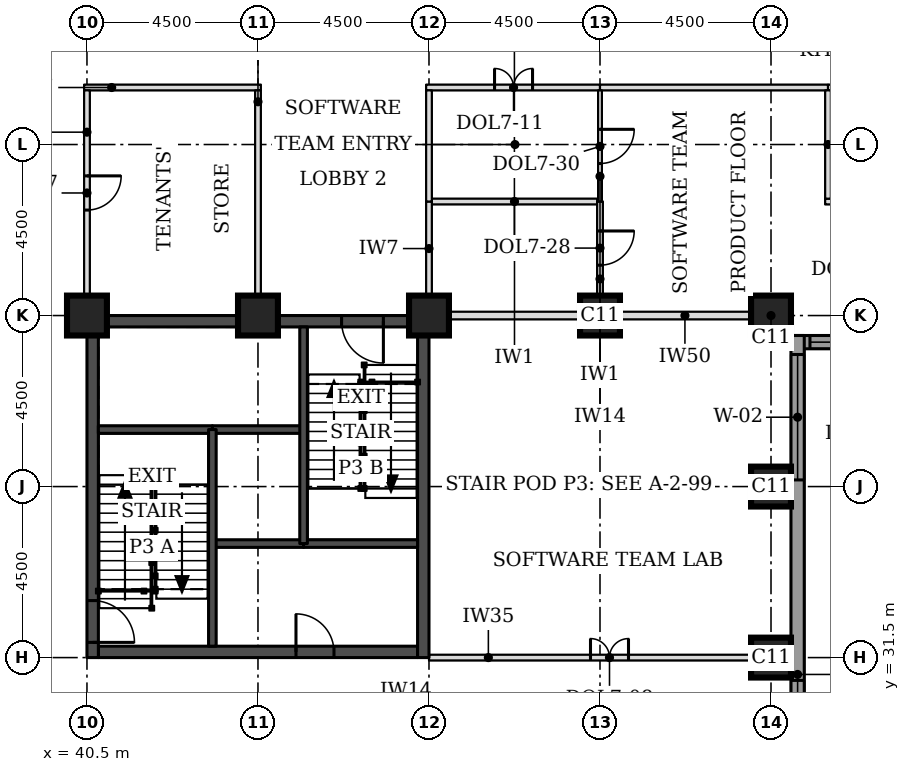
"""IFC4 building model, lengths in metres.
Left out: names, types, materials, properties, quantities, classifications, styles, units other than length and angle.
Written with IfcOpenShell. Run it as: python <this file> out.ifc"""

import sys

from ifc_helpers import new_model, si_unit, direction, frame, frame_2d, origin, origin_2d, place, context, subcontext, project, spatial, rectangle, extrude, element, fill, save


model = new_model("IFC4")
c1 = context("Model", 3, precision=1e-05, world=origin(), true_north=direction((0.0, 1.0)))
c2 = subcontext(c1, "Body", "Model", "MODEL_VIEW")
j1 = project(units=[si_unit("LENGTHUNIT", "METRE"), si_unit("PLANEANGLEUNIT", "RADIAN")], contexts=[c1])
p1 = place(None, origin())
s1 = spatial("IfcSite", under=j1, at=p1, CompositionType="ELEMENT")
p2 = place(p1, origin())
s2 = spatial("IfcBuilding", under=s1, at=p2, CompositionType="ELEMENT")
p3 = place(p2, frame((0.0, 0.0, 130.7)))
s3 = spatial("IfcBuildingStorey", under=s2, at=p3, CompositionType="ELEMENT", Elevation=130.7)
for number, where, z_axis, x_axis in (
    (1, (58.5, 31.5, 0.0), (0.0, 0.0, 1.0), (1.0, 0.0, 0.0)),
    (2, (58.5, 36.0, 0.0), (0.0, 0.0, 1.0), (1.0, 0.0, 0.0)),
    (3, (40.5, 40.5, 0.0), (0.0, 0.0, 1.0), (1.0, 0.0, 0.0)),
    (4, (45.0, 40.5, 0.0), (0.0, 0.0, 1.0), (1.0, 0.0, 0.0)),
    (5, (49.5, 40.5, 0.0), (0.0, 0.0, 1.0), (1.0, 0.0, 0.0)),
    (6, (54.0, 40.5, 0.0), (0.0, 0.0, 1.0), (1.0, 0.0, 0.0)),
    (7, (58.5, 40.5, 0.0), (0.0, 0.0, 1.0), (1.0, 0.0, 0.0)),
):
    element("IfcColumn", number, at=place(p3, frame(where, z_axis=z_axis, x_axis=x_axis)), inside=s3, PredefinedType="COLUMN", context=c2, shape_type="SweptSolid", body=[
        extrude(rectangle(XDim=1.05, YDim=1.05, at=origin_2d()), origin(), (0.0, 0.0, 1.0), 3.7),
    ])
p4 = place(p3, frame((40.8, 31.65, 0.0), z_axis=(0.0, 0.0, 1.0), x_axis=(1.0, 0.0, 0.0)))
e8 = element("IfcWall", 8, at=p4, inside=s3, PredefinedType="SHEAR", context=c2, shape_type="SweptSolid", body=[
    extrude(rectangle(XDim=8.4, YDim=0.3, at=frame_2d((4.2, 0.0))), origin(), (0.0, 0.0, 1.0), 3.7),
])
p5 = place(p4, frame((5.2, 0.0, 0.0)))
e9 = element("IfcOpeningElement", 9, at=p5, cuts=e8, PredefinedType="OPENING", context=c2, shape_type="SweptSolid", body=[
    extrude(rectangle(XDim=1.0, YDim=2.1, at=frame_2d((0.5, 1.05))), frame((0.0, 0.16, 0.0), z_axis=(0.0, -1.0, 0.0), x_axis=(1.0, 0.0, 0.0)), (0.0, 0.0, 1.0), 0.32),
])
p6 = place(p3, frame((40.8, 40.35, 0.0), z_axis=(0.0, 0.0, 1.0), x_axis=(1.0, 0.0, 0.0)))
e10 = element("IfcWall", 10, at=p6, inside=s3, PredefinedType="SHEAR", context=c2, shape_type="SweptSolid", body=[
    extrude(rectangle(XDim=8.4, YDim=0.3, at=frame_2d((4.2, 0.0))), origin(), (0.0, 0.0, 1.0), 3.7),
])
p7 = place(p6, frame((6.4, 0.0, 0.0)))
e11 = element("IfcOpeningElement", 11, at=p7, cuts=e10, PredefinedType="OPENING", context=c2, shape_type="SweptSolid", body=[
    extrude(rectangle(XDim=1.1, YDim=2.1, at=frame_2d((0.55, 1.05))), frame((0.0, 0.16, 0.0), z_axis=(0.0, -1.0, 0.0), x_axis=(1.0, 0.0, 0.0)), (0.0, 0.0, 1.0), 0.32),
])
p8 = place(p3, frame((40.65, 31.5, 0.0), z_axis=(0.0, 0.0, 1.0), x_axis=(0.0, 1.0, 0.0)))
e12 = element("IfcWall", 12, at=p8, inside=s3, PredefinedType="SHEAR", context=c2, shape_type="SweptSolid", body=[
    extrude(rectangle(XDim=9.0, YDim=0.3, at=frame_2d((4.5, 0.0))), origin(), (0.0, 0.0, 1.0), 3.7),
])
p9 = place(p8, frame((0.4, 0.0, 0.0)))
e13 = element("IfcOpeningElement", 13, at=p9, cuts=e12, PredefinedType="OPENING", context=c2, shape_type="SweptSolid", body=[
    extrude(rectangle(XDim=1.1, YDim=2.1, at=frame_2d((0.55, 1.05))), frame((0.0, 0.16, 0.0), z_axis=(0.0, -1.0, 0.0), x_axis=(1.0, 0.0, 0.0)), (0.0, 0.0, 1.0), 0.32),
])
p10 = place(p3, frame((49.35, 31.5, 0.0), z_axis=(0.0, 0.0, 1.0), x_axis=(0.0, 1.0, 0.0)))
e14 = element("IfcWall", 14, at=p10, inside=s3, PredefinedType="SHEAR", context=c2, shape_type="SweptSolid", body=[
    extrude(rectangle(XDim=9.0, YDim=0.3, at=frame_2d((4.5, 0.0))), origin(), (0.0, 0.0, 1.0), 3.7),
])
p11 = place(p3, frame((59.025, 39.8, 0.0), z_axis=(0.0, 0.0, 1.0), x_axis=(1.0, 0.0, 0.0)))
e15 = element("IfcWall", 15, at=p11, inside=s3, PredefinedType="STANDARD", context=c2, shape_type="SweptSolid", body=[
    extrude(rectangle(XDim=13.337, YDim=0.35, at=frame_2d((6.669, 0.0))), origin(), (0.0, 0.0, 1.0), 3.525),
])
p12 = place(p11, frame((0.5, 0.0, 0.9)))
e16 = element("IfcOpeningElement", 16, at=p12, cuts=e15, PredefinedType="OPENING", context=c2, shape_type="SweptSolid", body=[
    extrude(rectangle(XDim=3.3, YDim=1.9, at=frame_2d((1.65, 0.95))), frame((0.0, 0.185, 0.0), z_axis=(0.0, -1.0, 0.0), x_axis=(1.0, 0.0, 0.0)), (0.0, 0.0, 1.0), 0.37),
])
p13 = place(p3, frame((59.2, 22.138, 0.0), z_axis=(0.0, 0.0, 1.0), x_axis=(0.0, 1.0, 0.0)))
e17 = element("IfcWall", 17, at=p13, inside=s3, PredefinedType="STANDARD", context=c2, shape_type="SweptSolid", body=[
    extrude(rectangle(XDim=17.837, YDim=0.35, at=frame_2d((8.919, 0.0))), origin(), (0.0, 0.0, 1.0), 3.525),
])
p14 = place(p13, frame((5.462, 0.0, 0.9)))
e18 = element("IfcOpeningElement", 18, at=p14, cuts=e17, PredefinedType="OPENING", context=c2, shape_type="SweptSolid", body=[
    extrude(rectangle(XDim=3.3, YDim=1.9, at=frame_2d((1.65, 0.95))), frame((0.0, 0.185, 0.0), z_axis=(0.0, -1.0, 0.0), x_axis=(1.0, 0.0, 0.0)), (0.0, 0.0, 1.0), 0.37),
])
p15 = place(p13, frame((14.037, 0.0, 0.9)))
e19 = element("IfcOpeningElement", 19, at=p15, cuts=e17, PredefinedType="OPENING", context=c2, shape_type="SweptSolid", body=[
    extrude(rectangle(XDim=3.3, YDim=1.9, at=frame_2d((1.65, 0.95))), frame((0.0, 0.185, 0.0), z_axis=(0.0, -1.0, 0.0), x_axis=(1.0, 0.0, 0.0)), (0.0, 0.0, 1.0), 0.37),
])
p16 = place(p3, frame((49.5, 31.5, 0.0), z_axis=(0.0, 0.0, 1.0), x_axis=(1.0, 0.0, 0.0)))
e20 = element("IfcWall", 20, at=p16, inside=s3, PredefinedType="PARTITIONING", context=c2, shape_type="SweptSolid", body=[
    extrude(rectangle(XDim=9.525, YDim=0.15, at=frame_2d((4.762, 0.0))), origin(), (0.0, 0.0, 1.0), 2.55),
])
p17 = place(p16, frame((4.25, 0.0, 0.0)))
e21 = element("IfcOpeningElement", 21, at=p17, cuts=e20, PredefinedType="OPENING", context=c2, shape_type="SweptSolid", body=[
    extrude(rectangle(XDim=1.0, YDim=2.1, at=frame_2d((0.5, 1.05))), frame((0.0, 0.085, 0.0), z_axis=(0.0, -1.0, 0.0), x_axis=(1.0, 0.0, 0.0)), (0.0, 0.0, 1.0), 0.17),
])
p18 = place(p3, frame((50.015, 40.5, 0.0), z_axis=(0.0, 0.0, 1.0), x_axis=(1.0, 0.0, 0.0)))
e22 = element("IfcWall", 22, at=p18, inside=s3, PredefinedType="PARTITIONING", context=c2, shape_type="SweptSolid", body=[
    extrude(rectangle(XDim=3.46, YDim=0.2, at=frame_2d((1.73, 0.0))), origin(), (0.0, 0.0, 1.0), 2.8),
])
p19 = place(p3, frame((54.495, 40.5, 0.0), z_axis=(0.0, 0.0, 1.0), x_axis=(1.0, 0.0, 0.0)))
e23 = element("IfcWall", 23, at=p19, inside=s3, PredefinedType="PARTITIONING", context=c2, shape_type="SweptSolid", body=[
    extrude(rectangle(XDim=3.48, YDim=0.2, at=frame_2d((1.74, 0.0))), origin(), (0.0, 0.0, 1.0), 2.8),
])
p20 = place(p3, frame((49.575, 43.5, 0.0), z_axis=(0.0, 0.0, 1.0), x_axis=(1.0, 0.0, 0.0)))
e24 = element("IfcWall", 24, at=p20, inside=s3, PredefinedType="PARTITIONING", context=c2, shape_type="SweptSolid", body=[
    extrude(rectangle(XDim=4.35, YDim=0.15, at=frame_2d((2.175, 0.0))), origin(), (0.0, 0.0, 1.0), 3.55),
])
p21 = place(p3, frame((59.925, 43.5, 0.0), z_axis=(0.0, 0.0, 1.0), x_axis=(1.0, 0.0, 0.0)))
e25 = element("IfcWall", 25, at=p21, inside=s3, PredefinedType="PARTITIONING", context=c2, shape_type="SweptSolid", body=[
    extrude(rectangle(XDim=2.975, YDim=0.15, at=frame_2d((1.487, 0.0))), origin(), (0.0, 0.0, 1.0), 3.55),
])
p22 = place(p21, frame((1.05, 0.0, 0.0)))
e26 = element("IfcOpeningElement", 26, at=p22, cuts=e25, PredefinedType="OPENING", context=c2, shape_type="SweptSolid", body=[
    extrude(rectangle(XDim=0.9, YDim=2.1, at=frame_2d((0.45, 1.05))), frame((0.0, 0.085, 0.0), z_axis=(0.0, -1.0, 0.0), x_axis=(1.0, 0.0, 0.0)), (0.0, 0.0, 1.0), 0.17),
])
p23 = place(p3, frame((40.425, 46.5, 0.0), z_axis=(0.0, 0.0, 1.0), x_axis=(1.0, 0.0, 0.0)))
e27 = element("IfcWall", 27, at=p23, inside=s3, PredefinedType="PARTITIONING", context=c2, shape_type="SweptSolid", body=[
    extrude(rectangle(XDim=4.65, YDim=0.15, at=frame_2d((2.325, 0.0))), origin(), (0.0, 0.0, 1.0), 3.55),
])
p24 = place(p3, frame((49.425, 46.5, 0.0), z_axis=(0.0, 0.0, 1.0), x_axis=(1.0, 0.0, 0.0)))
e28 = element("IfcWall", 28, at=p24, inside=s3, PredefinedType="PARTITIONING", context=c2, shape_type="SweptSolid", body=[
    extrude(rectangle(XDim=4.575, YDim=0.15, at=frame_2d((2.288, 0.0))), origin(), (0.0, 0.0, 1.0), 3.55),
])
p25 = place(p24, frame((1.8, 0.0, 0.0)))
e29 = element("IfcOpeningElement", 29, at=p25, cuts=e28, PredefinedType="OPENING", context=c2, shape_type="SweptSolid", body=[
    extrude(rectangle(XDim=1.0, YDim=2.1, at=frame_2d((0.5, 1.05))), frame((0.0, 0.085, 0.0), z_axis=(0.0, -1.0, 0.0), x_axis=(1.0, 0.0, 0.0)), (0.0, 0.0, 1.0), 0.17),
])
p26 = place(p3, frame((54.0, 46.5, 0.0), z_axis=(0.0, 0.0, 1.0), x_axis=(1.0, 0.0, 0.0)))
e30 = element("IfcWall", 30, at=p26, inside=s3, PredefinedType="PARTITIONING", context=c2, shape_type="SweptSolid", body=[
    extrude(rectangle(XDim=6.0, YDim=0.15, at=frame_2d((3.0, 0.0))), origin(), (0.0, 0.0, 1.0), 3.55),
])
p27 = place(p3, frame((60.0, 46.5, 0.0), z_axis=(0.0, 0.0, 1.0), x_axis=(1.0, 0.0, 0.0)))
e31 = element("IfcWall", 31, at=p27, inside=s3, PredefinedType="PARTITIONING", context=c2, shape_type="SweptSolid", body=[
    extrude(rectangle(XDim=3.0, YDim=0.15, at=frame_2d((1.5, 0.0))), origin(), (0.0, 0.0, 1.0), 3.55),
])
p28 = place(p3, frame((40.5, 41.025, 0.0), z_axis=(0.0, 0.0, 1.0), x_axis=(0.0, 1.0, 0.0)))
e32 = element("IfcWall", 32, at=p28, inside=s3, PredefinedType="PARTITIONING", context=c2, shape_type="SweptSolid", body=[
    extrude(rectangle(XDim=5.4, YDim=0.15, at=frame_2d((2.7, 0.0))), origin(), (0.0, 0.0, 1.0), 3.55),
])
p29 = place(p28, frame((2.25, 0.0, 0.0)))
e33 = element("IfcOpeningElement", 33, at=p29, cuts=e32, PredefinedType="OPENING", context=c2, shape_type="SweptSolid", body=[
    extrude(rectangle(XDim=0.9, YDim=2.1, at=frame_2d((0.45, 1.05))), frame((0.0, 0.085, 0.0), z_axis=(0.0, -1.0, 0.0), x_axis=(1.0, 0.0, 0.0)), (0.0, 0.0, 1.0), 0.17),
])
p30 = place(p3, frame((45.0, 41.025, 0.0), z_axis=(0.0, 0.0, 1.0), x_axis=(0.0, 1.0, 0.0)))
e34 = element("IfcWall", 34, at=p30, inside=s3, PredefinedType="PARTITIONING", context=c2, shape_type="SweptSolid", body=[
    extrude(rectangle(XDim=5.4, YDim=0.15, at=frame_2d((2.7, 0.0))), origin(), (0.0, 0.0, 1.0), 3.55),
])
p31 = place(p3, frame((49.5, 41.025, 0.0), z_axis=(0.0, 0.0, 1.0), x_axis=(0.0, 1.0, 0.0)))
e35 = element("IfcWall", 35, at=p31, inside=s3, PredefinedType="PARTITIONING", context=c2, shape_type="SweptSolid", body=[
    extrude(rectangle(XDim=2.475, YDim=0.15, at=frame_2d((1.238, 0.0))), origin(), (0.0, 0.0, 1.0), 3.55),
])
p32 = place(p3, frame((54.0, 41.025, 0.0), z_axis=(0.0, 0.0, 1.0), x_axis=(0.0, 1.0, 0.0)))
e36 = element("IfcWall", 36, at=p32, inside=s3, PredefinedType="PARTITIONING", context=c2, shape_type="SweptSolid", body=[
    extrude(rectangle(XDim=2.475, YDim=0.15, at=frame_2d((1.238, 0.0))), origin(), (0.0, 0.0, 1.0), 3.55),
])
p33 = place(p32, frame((0.8, 0.0, 0.0)))
e37 = element("IfcOpeningElement", 37, at=p33, cuts=e36, PredefinedType="OPENING", context=c2, shape_type="SweptSolid", body=[
    extrude(rectangle(XDim=0.9, YDim=2.1, at=frame_2d((0.45, 1.05))), frame((0.0, 0.085, 0.0), z_axis=(0.0, -1.0, 0.0), x_axis=(1.0, 0.0, 0.0)), (0.0, 0.0, 1.0), 0.17),
])
p34 = place(p3, frame((49.5, 43.5, 0.0), z_axis=(0.0, 0.0, 1.0), x_axis=(0.0, 1.0, 0.0)))
e38 = element("IfcWall", 38, at=p34, inside=s3, PredefinedType="PARTITIONING", context=c2, shape_type="SweptSolid", body=[
    extrude(rectangle(XDim=2.925, YDim=0.15, at=frame_2d((1.462, 0.0))), origin(), (0.0, 0.0, 1.0), 3.55),
])
p35 = place(p3, frame((54.0, 43.5, 0.0), z_axis=(0.0, 0.0, 1.0), x_axis=(0.0, 1.0, 0.0)))
e39 = element("IfcWall", 39, at=p35, inside=s3, PredefinedType="PARTITIONING", context=c2, shape_type="SweptSolid", body=[
    extrude(rectangle(XDim=2.925, YDim=0.1, at=frame_2d((1.462, 0.0))), origin(), (0.0, 0.0, 1.0), 3.55),
])
p36 = place(p35, frame((1.0, 0.0, 0.0)))
e40 = element("IfcOpeningElement", 40, at=p36, cuts=e39, PredefinedType="OPENING", context=c2, shape_type="SweptSolid", body=[
    extrude(rectangle(XDim=0.9, YDim=2.1, at=frame_2d((0.45, 1.05))), frame((0.0, 0.06, 0.0), z_axis=(0.0, -1.0, 0.0), x_axis=(1.0, 0.0, 0.0)), (0.0, 0.0, 1.0), 0.12),
])
p37 = place(p3, frame((60.0, 43.575, 0.0), z_axis=(0.0, 0.0, 1.0), x_axis=(0.0, 1.0, 0.0)))
e41 = element("IfcWall", 41, at=p37, inside=s3, PredefinedType="PARTITIONING", context=c2, shape_type="SweptSolid", body=[
    extrude(rectangle(XDim=2.85, YDim=0.15, at=frame_2d((1.425, 0.0))), origin(), (0.0, 0.0, 1.0), 3.55),
])
p38 = place(p3, frame((43.8, 34.5, 0.0), z_axis=(0.0, 0.0, 1.0), x_axis=(1.0, 0.0, 0.0)))
e42 = element("IfcWall", 42, at=p38, inside=s3, PredefinedType="SOLIDWALL", context=c2, shape_type="SweptSolid", body=[
    extrude(rectangle(XDim=2.4, YDim=0.2, at=frame_2d((1.2, 0.0))), origin(), (0.0, 0.0, 1.0), 3.55),
])
p39 = place(p3, frame((46.2, 34.5, 0.0), z_axis=(0.0, 0.0, 1.0), x_axis=(1.0, 0.0, 0.0)))
e43 = element("IfcWall", 43, at=p39, inside=s3, PredefinedType="SOLIDWALL", context=c2, shape_type="SweptSolid", body=[
    extrude(rectangle(XDim=3.0, YDim=0.2, at=frame_2d((1.5, 0.0))), origin(), (0.0, 0.0, 1.0), 3.55),
])
p40 = place(p3, frame((43.8, 37.5, 0.0), z_axis=(0.0, 0.0, 1.0), x_axis=(1.0, 0.0, 0.0)))
e44 = element("IfcWall", 44, at=p40, inside=s3, PredefinedType="SOLIDWALL", context=c2, shape_type="SweptSolid", body=[
    extrude(rectangle(XDim=2.4, YDim=0.2, at=frame_2d((1.2, 0.0))), origin(), (0.0, 0.0, 1.0), 3.7),
])
p41 = place(p3, frame((40.8, 37.5, 0.0), z_axis=(0.0, 0.0, 1.0), x_axis=(1.0, 0.0, 0.0)))
e45 = element("IfcWall", 45, at=p41, inside=s3, PredefinedType="SOLIDWALL", context=c2, shape_type="SweptSolid", body=[
    extrude(rectangle(XDim=3.0, YDim=0.2, at=frame_2d((1.5, 0.0))), origin(), (0.0, 0.0, 1.0), 3.55),
])
for number, where, z_axis, x_axis in (
    (46, (43.8, 31.8, 0.0), (0.0, 0.0, 1.0), (0.0, 1.0, 0.0)),
    (47, (46.2, 34.5, 0.0), (0.0, 0.0, 1.0), (0.0, 1.0, 0.0)),
):
    element("IfcWall", number, at=place(p3, frame(where, z_axis=z_axis, x_axis=x_axis)), inside=s3, PredefinedType="SOLIDWALL", context=c2, shape_type="SweptSolid", body=[
        extrude(rectangle(XDim=5.7, YDim=0.2, at=frame_2d((2.85, 0.0))), origin(), (0.0, 0.0, 1.0), 3.55),
    ])
p42 = place(p12, origin())
e48 = element("IfcWindow", 48, at=p42, inside=s3, PartitioningType="SINGLE_PANEL", PredefinedType="WINDOW", context=c2, shape_type="SweptSolid", body=[
    extrude(rectangle(XDim=3.3, YDim=1.9, at=frame_2d((1.65, 0.95))), frame((0.0, 0.085, 0.0), z_axis=(0.0, -1.0, 0.0), x_axis=(1.0, 0.0, 0.0)), (0.0, 0.0, 1.0), 0.06),
])
fill(e16, e48)
p43 = place(p14, origin())
e49 = element("IfcWindow", 49, at=p43, inside=s3, PartitioningType="SINGLE_PANEL", PredefinedType="WINDOW", context=c2, shape_type="SweptSolid", body=[
    extrude(rectangle(XDim=3.3, YDim=1.9, at=frame_2d((1.65, 0.95))), frame((0.0, 0.085, 0.0), z_axis=(0.0, -1.0, 0.0), x_axis=(1.0, 0.0, 0.0)), (0.0, 0.0, 1.0), 0.06),
])
fill(e18, e49)
p44 = place(p15, origin())
e50 = element("IfcWindow", 50, at=p44, inside=s3, PartitioningType="SINGLE_PANEL", PredefinedType="WINDOW", context=c2, shape_type="SweptSolid", body=[
    extrude(rectangle(XDim=3.3, YDim=1.9, at=frame_2d((1.65, 0.95))), frame((0.0, 0.085, 0.0), z_axis=(0.0, -1.0, 0.0), x_axis=(1.0, 0.0, 0.0)), (0.0, 0.0, 1.0), 0.06),
])
fill(e19, e50)
p45 = place(p29, frame((0.9, 0.0, 0.0), z_axis=(0.0, 0.0, 1.0), x_axis=(-1.0, 0.0, 0.0)))
e51 = element("IfcDoor", 51, at=p45, inside=s3, OperationType="SINGLE_SWING_LEFT", PredefinedType="DOOR", context=c2, shape_type="SweptSolid", body=[
    extrude(rectangle(XDim=0.9, YDim=2.1, at=frame_2d((0.45, 1.05))), frame((0.0, 0.025, 0.0), z_axis=(0.0, -1.0, 0.0), x_axis=(1.0, 0.0, 0.0)), (0.0, 0.0, 1.0), 0.05),
])
fill(e33, e51)
p46 = place(p17, origin())
e52 = element("IfcDoor", 52, at=p46, inside=s3, OperationType="DOUBLE_DOOR_SINGLE_SWING", PredefinedType="DOOR", context=c2, shape_type="SweptSolid", body=[
    extrude(rectangle(XDim=1.0, YDim=2.1, at=frame_2d((0.5, 1.05))), frame((0.0, 0.025, 0.0), z_axis=(0.0, -1.0, 0.0), x_axis=(1.0, 0.0, 0.0)), (0.0, 0.0, 1.0), 0.05),
])
fill(e21, e52)
p47 = place(p25, origin())
e53 = element("IfcDoor", 53, at=p47, inside=s3, OperationType="DOUBLE_DOOR_SINGLE_SWING", PredefinedType="DOOR", context=c2, shape_type="SweptSolid", body=[
    extrude(rectangle(XDim=1.0, YDim=2.1, at=frame_2d((0.5, 1.05))), frame((0.0, 0.025, 0.0), z_axis=(0.0, -1.0, 0.0), x_axis=(1.0, 0.0, 0.0)), (0.0, 0.0, 1.0), 0.05),
])
fill(e29, e53)
p48 = place(p36, frame((0.9, 0.0, 0.0), z_axis=(0.0, 0.0, 1.0), x_axis=(-1.0, 0.0, 0.0)))
e54 = element("IfcDoor", 54, at=p48, inside=s3, OperationType="SINGLE_SWING_LEFT", PredefinedType="DOOR", context=c2, shape_type="SweptSolid", body=[
    extrude(rectangle(XDim=0.9, YDim=2.1, at=frame_2d((0.45, 1.05))), frame((0.0, 0.025, 0.0), z_axis=(0.0, -1.0, 0.0), x_axis=(1.0, 0.0, 0.0)), (0.0, 0.0, 1.0), 0.05),
])
fill(e40, e54)
p49 = place(p33, frame((0.9, 0.0, 0.0), z_axis=(0.0, 0.0, 1.0), x_axis=(-1.0, 0.0, 0.0)))
e55 = element("IfcDoor", 55, at=p49, inside=s3, OperationType="SINGLE_SWING_LEFT", PredefinedType="DOOR", context=c2, shape_type="SweptSolid", body=[
    extrude(rectangle(XDim=0.9, YDim=2.1, at=frame_2d((0.45, 1.05))), frame((0.0, 0.025, 0.0), z_axis=(0.0, -1.0, 0.0), x_axis=(1.0, 0.0, 0.0)), (0.0, 0.0, 1.0), 0.05),
])
fill(e37, e55)
p50 = place(p9, frame((1.1, 0.0, 0.0), z_axis=(0.0, 0.0, 1.0), x_axis=(-1.0, 0.0, 0.0)))
e56 = element("IfcDoor", 56, at=p50, inside=s3, OperationType="SINGLE_SWING_RIGHT", PredefinedType="DOOR", context=c2, shape_type="SweptSolid", body=[
    extrude(rectangle(XDim=1.1, YDim=2.1, at=frame_2d((0.55, 1.05))), frame((0.0, 0.025, 0.0), z_axis=(0.0, -1.0, 0.0), x_axis=(1.0, 0.0, 0.0)), (0.0, 0.0, 1.0), 0.05),
])
fill(e13, e56)
p51 = place(p7, frame((1.1, 0.0, 0.0), z_axis=(0.0, 0.0, 1.0), x_axis=(-1.0, 0.0, 0.0)))
e57 = element("IfcDoor", 57, at=p51, inside=s3, OperationType="SINGLE_SWING_LEFT", PredefinedType="DOOR", context=c2, shape_type="SweptSolid", body=[
    extrude(rectangle(XDim=1.1, YDim=2.1, at=frame_2d((0.55, 1.05))), frame((0.0, 0.025, 0.0), z_axis=(0.0, -1.0, 0.0), x_axis=(1.0, 0.0, 0.0)), (0.0, 0.0, 1.0), 0.05),
])
fill(e11, e57)
p52 = place(p5, origin())
e58 = element("IfcDoor", 58, at=p52, inside=s3, OperationType="SINGLE_SWING_LEFT", PredefinedType="DOOR", context=c2, shape_type="SweptSolid", body=[
    extrude(rectangle(XDim=1.0, YDim=2.1, at=frame_2d((0.5, 1.05))), frame((0.0, 0.025, 0.0), z_axis=(0.0, -1.0, 0.0), x_axis=(1.0, 0.0, 0.0)), (0.0, 0.0, 1.0), 0.05),
])
fill(e9, e58)
save(model, sys.argv[1])
